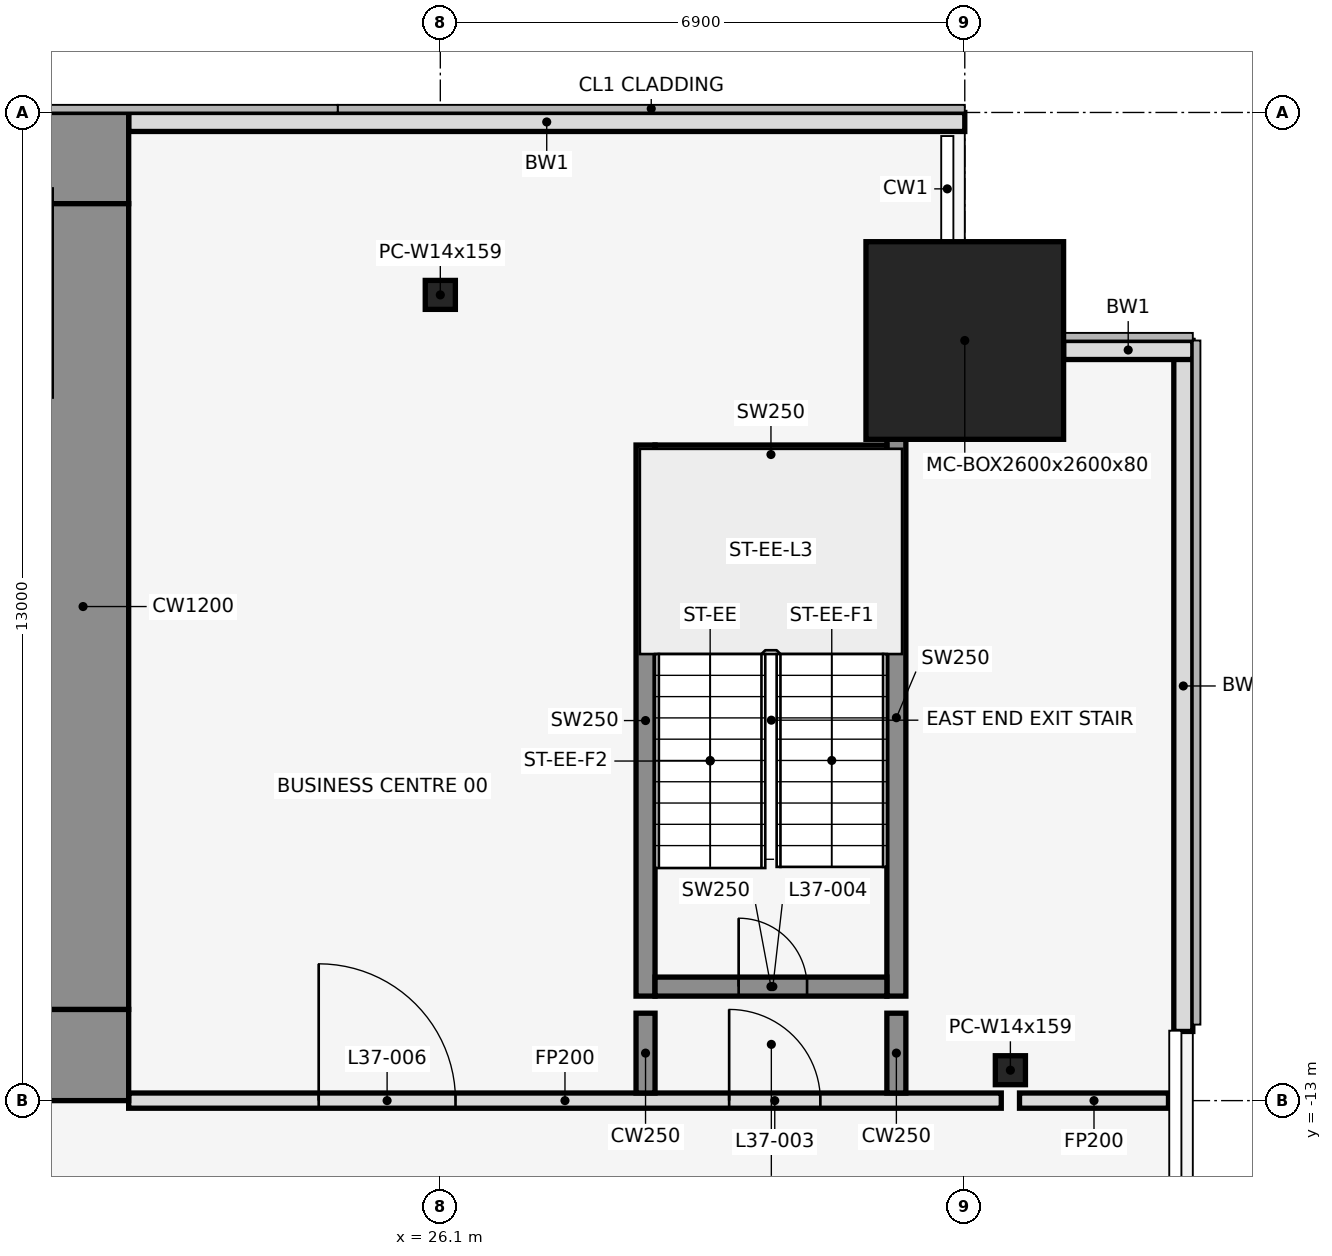
"""IFC4 building model, lengths in metres.
Left out: names, types, materials, properties, quantities, classifications, styles, units other than length and angle.
Written with IfcOpenShell. Run it as: python <this file> out.ifc"""

import sys

from ifc_helpers import new_model, si_unit, direction, frame, frame_2d, origin, origin_2d, place, context, subcontext, project, spatial, rectangle, hollow_rectangle, i_section, extrude, element, fill, save


model = new_model("IFC4")
c1 = context("Model", 3, precision=1e-05, world=origin(), true_north=direction((0.0, 1.0)))
c2 = subcontext(c1, "Body", "Model", "MODEL_VIEW")
j1 = project(units=[si_unit("LENGTHUNIT", "METRE"), si_unit("PLANEANGLEUNIT", "RADIAN")], contexts=[c1])
p1 = place(None, origin())
s1 = spatial("IfcSite", under=j1, at=p1, CompositionType="ELEMENT")
p2 = place(p1, origin())
s2 = spatial("IfcBuilding", under=s1, at=p2, CompositionType="ELEMENT")
p3 = place(p2, frame((0.0, 0.0, 169.1)))
s3 = spatial("IfcBuildingStorey", under=s2, at=p3, CompositionType="ELEMENT", Elevation=169.1)
p4 = place(p3, frame((26.1, -2.4, 0.0), z_axis=(0.0, 0.0, 1.0), x_axis=(1.0, 0.0, 0.0)))
e1 = element("IfcColumn", 1, at=p4, inside=s3, PredefinedType="COLUMN", context=c2, shape_type="SweptSolid", body=[
    extrude(i_section(OverallWidth=0.396, OverallDepth=0.381, WebThickness=0.019, FlangeThickness=0.03, at=origin_2d()), origin(), (0.0, 0.0, 1.0), 4.1),
])
p5 = place(p3, frame((33.0, -3.0, 0.0), z_axis=(0.0, 0.0, 1.0), x_axis=(1.0, 0.0, 0.0)))
e2 = element("IfcColumn", 2, at=p5, inside=s3, PredefinedType="COLUMN", context=c2, shape_type="SweptSolid", body=[
    extrude(hollow_rectangle(XDim=2.6, YDim=2.6, WallThickness=0.08, at=origin_2d()), origin(), (0.0, 0.0, 1.0), 4.1),
])
p6 = place(p3, frame((33.6, -12.6, 0.0), z_axis=(0.0, 0.0, 1.0), x_axis=(1.0, 0.0, 0.0)))
e3 = element("IfcColumn", 3, at=p6, inside=s3, PredefinedType="COLUMN", context=c2, shape_type="SweptSolid", body=[
    extrude(i_section(OverallWidth=0.396, OverallDepth=0.381, WebThickness=0.019, FlangeThickness=0.03, at=origin_2d()), origin(), (0.0, 0.0, 1.0), 4.1),
])
p7 = place(p3, frame((33.0, -0.125, 0.0), z_axis=(0.0, 0.0, 1.0), x_axis=(-1.0, 0.0, 0.0)))
e4 = element("IfcWall", 4, at=p7, inside=s3, PredefinedType="STANDARD", context=c2, shape_type="SweptSolid", body=[
    extrude(rectangle(XDim=11.0, YDim=0.25, at=frame_2d((5.5, 0.0))), origin(), (0.0, 0.0, 1.0), 3.95),
])
p8 = place(p3, frame((35.875, -12.09, 0.0), z_axis=(0.0, 0.0, 1.0), x_axis=(0.0, 1.0, 0.0)))
e5 = element("IfcWall", 5, at=p8, inside=s3, PredefinedType="STANDARD", context=c2, shape_type="SweptSolid", body=[
    extrude(rectangle(XDim=9.09, YDim=0.25, at=frame_2d((4.545, 0.0))), origin(), (0.0, 0.0, 1.0), 3.95),
])
p9 = place(p3, frame((36.0, -3.125, 0.0), z_axis=(0.0, 0.0, 1.0), x_axis=(-1.0, 0.0, 0.0)))
e6 = element("IfcWall", 6, at=p9, inside=s3, PredefinedType="STANDARD", context=c2, shape_type="SweptSolid", body=[
    extrude(rectangle(XDim=1.7, YDim=0.25, at=frame_2d((0.85, 0.0))), origin(), (0.0, 0.0, 1.0), 3.95),
])
p10 = place(p3, frame((28.8, -11.625, 0.0), z_axis=(0.0, 0.0, 1.0), x_axis=(0.0, 1.0, 0.0)))
e7 = element("IfcWall", 7, at=p10, inside=s3, PredefinedType="SHEAR", context=c2, shape_type="SweptSolid", body=[
    extrude(rectangle(XDim=7.25, YDim=0.25, at=frame_2d((3.625, 0.0))), origin(), (0.0, 0.0, 1.0), 4.1),
])
p11 = place(p3, frame((32.1, -11.625, 0.0), z_axis=(0.0, 0.0, 1.0), x_axis=(0.0, 1.0, 0.0)))
e8 = element("IfcWall", 8, at=p11, inside=s3, PredefinedType="SHEAR", context=c2, shape_type="SweptSolid", body=[
    extrude(rectangle(XDim=7.325, YDim=0.25, at=frame_2d((3.663, 0.0))), origin(), (0.0, 0.0, 1.0), 4.1),
])
p12 = place(p3, frame((28.925, -11.5, 0.0), z_axis=(0.0, 0.0, 1.0), x_axis=(1.0, 0.0, 0.0)))
e9 = element("IfcWall", 9, at=p12, inside=s3, PredefinedType="SHEAR", context=c2, shape_type="SweptSolid", body=[
    extrude(rectangle(XDim=3.05, YDim=0.25, at=frame_2d((1.525, 0.0))), origin(), (0.0, 0.0, 1.0), 4.1),
])
p13 = place(p12, frame((1.1, 0.0, 0.0)))
e10 = element("IfcOpeningElement", 10, at=p13, cuts=e9, PredefinedType="OPENING", context=c2, shape_type="SweptSolid", body=[
    extrude(rectangle(XDim=0.9, YDim=2.1, at=frame_2d((0.45, 1.05))), frame((0.0, 0.137, 0.0), z_axis=(0.0, -1.0, 0.0), x_axis=(1.0, 0.0, 0.0)), (0.0, 0.0, 1.0), 0.274),
])
p14 = place(p3, frame((28.925, -4.5, 0.0), z_axis=(0.0, 0.0, 1.0), x_axis=(1.0, 0.0, 0.0)))
e11 = element("IfcWall", 11, at=p14, inside=s3, PredefinedType="SHEAR", context=c2, shape_type="SweptSolid", body=[
    extrude(rectangle(XDim=3.05, YDim=0.25, at=frame_2d((1.525, 0.0))), origin(), (0.0, 0.0, 1.0), 4.1),
])
p15 = place(p3, frame((22.0, -13.0, 0.0), z_axis=(0.0, 0.0, 1.0), x_axis=(1.0, 0.0, 0.0)))
e12 = element("IfcWall", 12, at=p15, inside=s3, PredefinedType="PARTITIONING", context=c2, shape_type="SweptSolid", body=[
    extrude(rectangle(XDim=11.48, YDim=0.2, at=frame_2d((5.74, 0.0))), origin(), (0.0, 0.0, 1.0), 2.84),
])
p16 = place(p15, frame((7.9, 0.0, 0.0)))
e13 = element("IfcOpeningElement", 13, at=p16, cuts=e12, PredefinedType="OPENING", context=c2, shape_type="SweptSolid", body=[
    extrude(rectangle(XDim=1.2, YDim=2.1, at=frame_2d((0.6, 1.05))), frame((0.0, 0.112, 0.0), z_axis=(0.0, -1.0, 0.0), x_axis=(1.0, 0.0, 0.0)), (0.0, 0.0, 1.0), 0.224),
])
p17 = place(p15, frame((2.5, 0.0, 0.0)))
e14 = element("IfcOpeningElement", 14, at=p17, cuts=e12, PredefinedType="OPENING", context=c2, shape_type="SweptSolid", body=[
    extrude(rectangle(XDim=1.8, YDim=2.1, at=frame_2d((0.9, 1.05))), frame((0.0, 0.112, 0.0), z_axis=(0.0, -1.0, 0.0), x_axis=(1.0, 0.0, 0.0)), (0.0, 0.0, 1.0), 0.224),
])
p18 = place(p3, frame((33.72, -13.0, 0.0), z_axis=(0.0, 0.0, 1.0), x_axis=(1.0, 0.0, 0.0)))
e15 = element("IfcWall", 15, at=p18, inside=s3, PredefinedType="PARTITIONING", context=c2, shape_type="SweptSolid", body=[
    extrude(rectangle(XDim=1.96, YDim=0.2, at=frame_2d((0.98, 0.0))), origin(), (0.0, 0.0, 1.0), 2.84),
])
for number, where, z_axis, x_axis in (
    (16, (28.8, -12.9, 0.0), (0.0, 0.0, 1.0), (0.0, 1.0, 0.0)),
    (17, (32.1, -12.9, 0.0), (0.0, 0.0, 1.0), (0.0, 1.0, 0.0)),
):
    element("IfcWall", number, at=place(p3, frame(where, z_axis=z_axis, x_axis=x_axis)), inside=s3, PredefinedType="SHEAR", context=c2, shape_type="SweptSolid", body=[
        extrude(rectangle(XDim=1.05, YDim=0.25, at=frame_2d((0.525, 0.0))), origin(), (0.0, 0.0, 1.0), 4.1),
    ])
p19 = place(p3, frame((-22.0, -0.6, 0.0), z_axis=(0.0, 0.0, 1.0), x_axis=(1.0, 0.0, 0.0)))
e18 = element("IfcWall", 18, at=p19, inside=s3, PredefinedType="SHEAR", context=c2, shape_type="SweptSolid", body=[
    extrude(rectangle(XDim=44.0, YDim=1.2, at=frame_2d((22.0, 0.0))), origin(), (0.0, 0.0, 1.0), 4.1),
])
p20 = place(p19, frame((18.55, 0.0, 0.0)))
e19 = element("IfcOpeningElement", 19, at=p20, cuts=e18, PredefinedType="OPENING", context=c2, shape_type="SweptSolid", body=[
    extrude(rectangle(XDim=0.9, YDim=2.1, at=frame_2d((0.45, 1.05))), frame((0.0, 0.612, 0.0), z_axis=(0.0, -1.0, 0.0), x_axis=(1.0, 0.0, 0.0)), (0.0, 0.0, 1.0), 1.224),
])
p21 = place(p19, frame((24.55, 0.0, 0.0)))
e20 = element("IfcOpeningElement", 20, at=p21, cuts=e18, PredefinedType="OPENING", context=c2, shape_type="SweptSolid", body=[
    extrude(rectangle(XDim=0.9, YDim=2.1, at=frame_2d((0.45, 1.05))), frame((0.0, 0.612, 0.0), z_axis=(0.0, -1.0, 0.0), x_axis=(1.0, 0.0, 0.0)), (0.0, 0.0, 1.0), 1.224),
])
p22 = place(p3, frame((-22.0, -12.4, 0.0), z_axis=(0.0, 0.0, 1.0), x_axis=(1.0, 0.0, 0.0)))
e21 = element("IfcWall", 21, at=p22, inside=s3, PredefinedType="SHEAR", context=c2, shape_type="SweptSolid", body=[
    extrude(rectangle(XDim=44.0, YDim=1.2, at=frame_2d((22.0, 0.0))), origin(), (0.0, 0.0, 1.0), 4.1),
])
p23 = place(p22, frame((2.2, 0.0, 0.0)))
e22 = element("IfcOpeningElement", 22, at=p23, cuts=e21, PredefinedType="OPENING", context=c2, shape_type="SweptSolid", body=[
    extrude(rectangle(XDim=1.2, YDim=2.1, at=frame_2d((0.6, 1.05))), frame((0.0, 0.612, 0.0), z_axis=(0.0, -1.0, 0.0), x_axis=(1.0, 0.0, 0.0)), (0.0, 0.0, 1.0), 1.224),
])
p24 = place(p22, frame((21.4, 0.0, 0.0)))
e23 = element("IfcOpeningElement", 23, at=p24, cuts=e21, PredefinedType="OPENING", context=c2, shape_type="SweptSolid", body=[
    extrude(rectangle(XDim=1.2, YDim=2.1, at=frame_2d((0.6, 1.05))), frame((0.0, 0.612, 0.0), z_axis=(0.0, -1.0, 0.0), x_axis=(1.0, 0.0, 0.0)), (0.0, 0.0, 1.0), 1.224),
])
p25 = place(p22, frame((40.6, 0.0, 0.0)))
e24 = element("IfcOpeningElement", 24, at=p25, cuts=e21, PredefinedType="OPENING", context=c2, shape_type="SweptSolid", body=[
    extrude(rectangle(XDim=1.2, YDim=2.1, at=frame_2d((0.6, 1.05))), frame((0.0, 0.612, 0.0), z_axis=(0.0, -1.0, 0.0), x_axis=(1.0, 0.0, 0.0)), (0.0, 0.0, 1.0), 1.224),
])
p26 = place(p22, frame((16.0, 0.0, 0.0)))
e25 = element("IfcOpeningElement", 25, at=p26, cuts=e21, PredefinedType="OPENING", context=c2, shape_type="SweptSolid", body=[
    extrude(rectangle(XDim=1.8, YDim=2.1, at=frame_2d((0.9, 1.05))), frame((0.0, 0.612, 0.0), z_axis=(0.0, -1.0, 0.0), x_axis=(1.0, 0.0, 0.0)), (0.0, 0.0, 1.0), 1.224),
])
p27 = place(p22, frame((6.3, 0.0, 0.0)))
e26 = element("IfcOpeningElement", 26, at=p27, cuts=e21, PredefinedType="OPENING", context=c2, shape_type="SweptSolid", body=[
    extrude(rectangle(XDim=1.2, YDim=2.1, at=frame_2d((0.6, 1.05))), frame((0.0, 0.612, 0.0), z_axis=(0.0, -1.0, 0.0), x_axis=(1.0, 0.0, 0.0)), (0.0, 0.0, 1.0), 1.224),
])
p28 = place(p22, frame((26.2, 0.0, 0.0)))
e27 = element("IfcOpeningElement", 27, at=p28, cuts=e21, PredefinedType="OPENING", context=c2, shape_type="SweptSolid", body=[
    extrude(rectangle(XDim=1.8, YDim=2.1, at=frame_2d((0.9, 1.05))), frame((0.0, 0.612, 0.0), z_axis=(0.0, -1.0, 0.0), x_axis=(1.0, 0.0, 0.0)), (0.0, 0.0, 1.0), 1.224),
])
p29 = place(p22, frame((36.5, 0.0, 0.0)))
e28 = element("IfcOpeningElement", 28, at=p29, cuts=e21, PredefinedType="OPENING", context=c2, shape_type="SweptSolid", body=[
    extrude(rectangle(XDim=1.2, YDim=2.1, at=frame_2d((0.6, 1.05))), frame((0.0, 0.612, 0.0), z_axis=(0.0, -1.0, 0.0), x_axis=(1.0, 0.0, 0.0)), (0.0, 0.0, 1.0), 1.224),
])
p30 = place(p3, frame((21.4, -11.8, 0.0), z_axis=(0.0, 0.0, 1.0), x_axis=(0.0, 1.0, 0.0)))
e29 = element("IfcWall", 29, at=p30, inside=s3, PredefinedType="SHEAR", context=c2, shape_type="SweptSolid", body=[
    extrude(rectangle(XDim=10.6, YDim=1.2, at=frame_2d((5.3, 0.0))), origin(), (0.0, 0.0, 1.0), 4.1),
])
p31 = place(p16, origin())
e30 = element("IfcDoor", 30, at=p31, inside=s3, OperationType="SINGLE_SWING_RIGHT", PredefinedType="DOOR", context=c2, shape_type="SweptSolid", body=[
    extrude(rectangle(XDim=1.2, YDim=2.1, at=frame_2d((0.6, 1.05))), frame((0.0, 0.025, 0.0), z_axis=(0.0, -1.0, 0.0), x_axis=(1.0, 0.0, 0.0)), (0.0, 0.0, 1.0), 0.05),
])
fill(e13, e30)
p32 = place(p13, origin())
e31 = element("IfcDoor", 31, at=p32, inside=s3, OperationType="SINGLE_SWING_LEFT", PredefinedType="DOOR", context=c2, shape_type="SweptSolid", body=[
    extrude(rectangle(XDim=0.9, YDim=2.1, at=frame_2d((0.45, 1.05))), frame((0.0, 0.025, 0.0), z_axis=(0.0, -1.0, 0.0), x_axis=(1.0, 0.0, 0.0)), (0.0, 0.0, 1.0), 0.05),
])
fill(e10, e31)
p33 = place(p17, origin())
e32 = element("IfcDoor", 32, at=p33, inside=s3, OperationType="SINGLE_SWING_LEFT", PredefinedType="DOOR", context=c2, shape_type="SweptSolid", body=[
    extrude(rectangle(XDim=1.8, YDim=2.1, at=frame_2d((0.9, 1.05))), frame((0.0, 0.025, 0.0), z_axis=(0.0, -1.0, 0.0), x_axis=(1.0, 0.0, 0.0)), (0.0, 0.0, 1.0), 0.05),
])
fill(e14, e32)
save(model, sys.argv[1])
